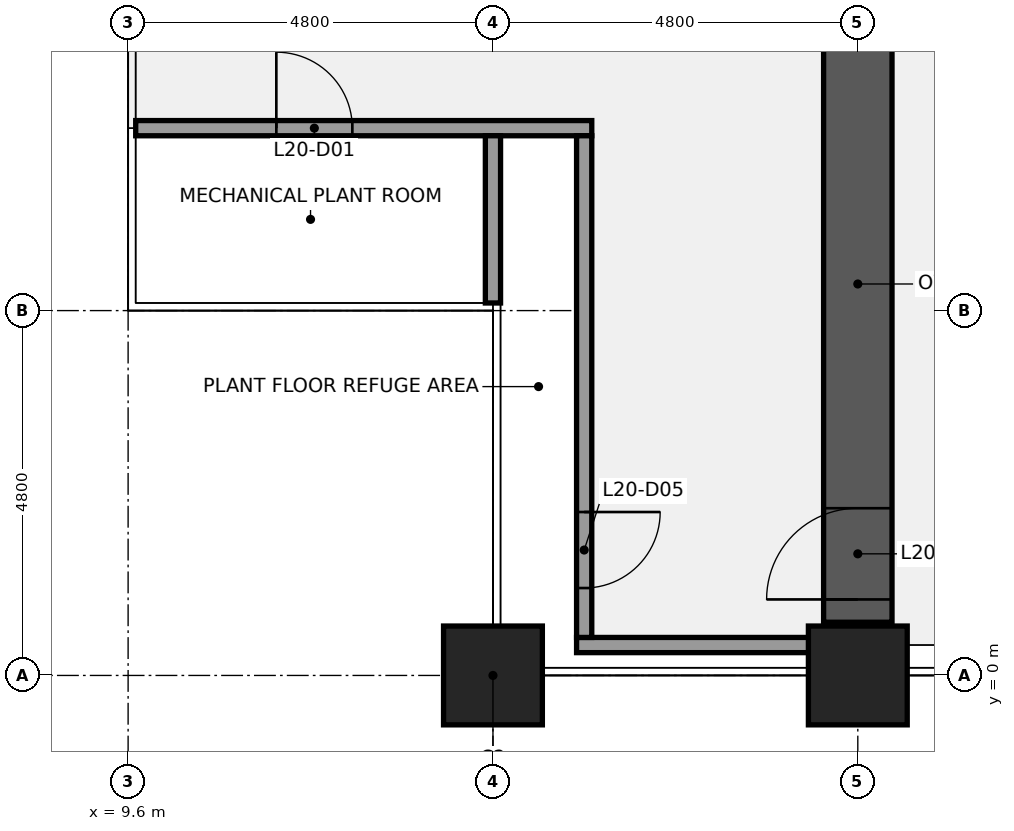
"""IFC4 building model, lengths in metres.
Left out: names, types, materials, properties, quantities, classifications, styles, units other than length and angle.
Written with IfcOpenShell. Run it as: python <this file> out.ifc"""

import sys

from ifc_helpers import new_model, si_unit, direction, frame, frame_2d, origin, origin_2d, place, context, subcontext, project, spatial, rectangle, extrude, element, fill, save


model = new_model("IFC4")
c1 = context("Model", 3, precision=1e-05, world=origin(), true_north=direction((0.0, 1.0)))
c2 = subcontext(c1, "Body", "Model", "MODEL_VIEW")
j1 = project(units=[si_unit("LENGTHUNIT", "METRE"), si_unit("PLANEANGLEUNIT", "RADIAN")], contexts=[c1])
p1 = place(None, origin())
s1 = spatial("IfcSite", under=j1, at=p1, CompositionType="ELEMENT")
p2 = place(p1, origin())
s2 = spatial("IfcBuilding", under=s1, at=p2, CompositionType="ELEMENT")
p3 = place(p2, frame((0.0, 0.0, 91.5)))
s3 = spatial("IfcBuildingStorey", under=s2, at=p3, CompositionType="ELEMENT", Elevation=91.5)
for number, where, z_axis, x_axis in (
    (1, (14.4, 0.0, 0.0), (0.0, 0.0, 1.0), (1.0, 0.0, 0.0)),
    (2, (19.2, 0.0, 0.0), (0.0, 0.0, 1.0), (1.0, 0.0, 0.0)),
):
    element("IfcColumn", number, at=place(p3, frame(where, z_axis=z_axis, x_axis=x_axis)), inside=s3, PredefinedType="COLUMN", context=c2, shape_type="SweptSolid", body=[
        extrude(rectangle(XDim=1.3, YDim=1.3, at=origin_2d()), origin(), (0.0, 0.0, 1.0), 12.6),
    ])
p4 = place(p3, frame((19.2, 0.7, 0.0), z_axis=(0.0, 0.0, 1.0), x_axis=(0.0, 1.0, 0.0)))
e3 = element("IfcWall", 3, at=p4, inside=s3, PredefinedType="SHEAR", context=c2, shape_type="SweptSolid", body=[
    extrude(rectangle(XDim=8.9, YDim=0.9, at=frame_2d((4.45, 0.0))), origin(), (0.0, 0.0, 1.0), 12.3),
])
p5 = place(p4, frame((0.3, 0.0, 0.0)))
e4 = element("IfcOpeningElement", 4, at=p5, cuts=e3, PredefinedType="OPENING", context=c2, shape_type="SweptSolid", body=[
    extrude(rectangle(XDim=1.2, YDim=2.1, at=frame_2d((0.6, 1.05))), frame((0.0, 0.46, 0.0), z_axis=(0.0, -1.0, 0.0), x_axis=(1.0, 0.0, 0.0)), (0.0, 0.0, 1.0), 0.92),
])
p6 = place(p3, frame((15.5, 0.4, 0.0), z_axis=(0.0, 0.0, 1.0), x_axis=(1.0, 0.0, 0.0)))
e5 = element("IfcWall", 5, at=p6, inside=s3, PredefinedType="PARTITIONING", context=c2, shape_type="SweptSolid", body=[
    extrude(rectangle(XDim=3.8, YDim=0.2, at=frame_2d((1.9, 0.0))), origin(), (0.0, 0.0, 1.0), 11.309),
])
p7 = place(p3, frame((9.7, 7.2, 0.0), z_axis=(0.0, 0.0, 1.0), x_axis=(1.0, 0.0, 0.0)))
e6 = element("IfcWall", 6, at=p7, inside=s3, PredefinedType="PARTITIONING", context=c2, shape_type="SweptSolid", body=[
    extrude(rectangle(XDim=6.0, YDim=0.2, at=frame_2d((3.0, 0.0))), origin(), (0.0, 0.0, 1.0), 11.309),
])
p8 = place(p7, frame((1.85, 0.0, 0.0)))
e7 = element("IfcOpeningElement", 7, at=p8, cuts=e6, PredefinedType="OPENING", context=c2, shape_type="SweptSolid", body=[
    extrude(rectangle(XDim=1.0, YDim=2.1, at=frame_2d((0.5, 1.05))), frame((0.0, 0.11, 0.0), z_axis=(0.0, -1.0, 0.0), x_axis=(1.0, 0.0, 0.0)), (0.0, 0.0, 1.0), 0.22),
])
p9 = place(p3, frame((14.4, 4.9, 0.0), z_axis=(0.0, 0.0, 1.0), x_axis=(0.0, 1.0, 0.0)))
e8 = element("IfcWall", 8, at=p9, inside=s3, PredefinedType="PARTITIONING", context=c2, shape_type="SweptSolid", body=[
    extrude(rectangle(XDim=2.2, YDim=0.2, at=frame_2d((1.1, 0.0))), origin(), (0.0, 0.0, 1.0), 11.309),
])
p10 = place(p3, frame((15.6, 0.5, 0.0), z_axis=(0.0, 0.0, 1.0), x_axis=(0.0, 1.0, 0.0)))
e9 = element("IfcWall", 9, at=p10, inside=s3, PredefinedType="PARTITIONING", context=c2, shape_type="SweptSolid", body=[
    extrude(rectangle(XDim=6.6, YDim=0.2, at=frame_2d((3.3, 0.0))), origin(), (0.0, 0.0, 1.0), 11.309),
])
p11 = place(p10, frame((0.65, 0.0, 0.0)))
e10 = element("IfcOpeningElement", 10, at=p11, cuts=e9, PredefinedType="OPENING", context=c2, shape_type="SweptSolid", body=[
    extrude(rectangle(XDim=1.0, YDim=2.1, at=frame_2d((0.5, 1.05))), frame((0.0, 0.11, 0.0), z_axis=(0.0, -1.0, 0.0), x_axis=(1.0, 0.0, 0.0)), (0.0, 0.0, 1.0), 0.22),
])
for number, where, z_axis, x_axis in (
    (11, (14.4, -1.075, 0.0), (0.0, 0.0, 1.0), (1.0, 0.0, 0.0)),
    (12, (19.2, -1.075, 0.0), (0.0, 0.0, 1.0), (1.0, 0.0, 0.0)),
):
    element("IfcColumn", number, at=place(p3, frame(where, z_axis=z_axis, x_axis=x_axis)), inside=s3, PredefinedType="PILASTER", context=c2, shape_type="SweptSolid", body=[
        extrude(rectangle(XDim=4.2, YDim=0.85, at=origin_2d()), origin(), (0.0, 0.0, 1.0), 12.6),
    ])
p12 = place(p8, origin())
e13 = element("IfcDoor", 13, at=p12, inside=s3, OperationType="SINGLE_SWING_LEFT", PredefinedType="DOOR", context=c2, shape_type="SweptSolid", body=[
    extrude(rectangle(XDim=1.0, YDim=2.1, at=frame_2d((0.5, 1.05))), frame((0.0, 0.025, 0.0), z_axis=(0.0, -1.0, 0.0), x_axis=(1.0, 0.0, 0.0)), (0.0, 0.0, 1.0), 0.05),
])
fill(e7, e13)
p13 = place(p11, origin())
e14 = element("IfcDoor", 14, at=p13, inside=s3, OperationType="SINGLE_SWING_RIGHT", PredefinedType="DOOR", context=c2, shape_type="SweptSolid", body=[
    extrude(rectangle(XDim=1.0, YDim=2.1, at=frame_2d((0.5, 1.05))), frame((0.0, 0.025, 0.0), z_axis=(0.0, -1.0, 0.0), x_axis=(1.0, 0.0, 0.0)), (0.0, 0.0, 1.0), 0.05),
])
fill(e10, e14)
p14 = place(p5, origin())
e15 = element("IfcDoor", 15, at=p14, inside=s3, OperationType="SINGLE_SWING_LEFT", PredefinedType="DOOR", context=c2, shape_type="SweptSolid", body=[
    extrude(rectangle(XDim=1.2, YDim=2.1, at=frame_2d((0.6, 1.05))), frame((0.0, 0.025, 0.0), z_axis=(0.0, -1.0, 0.0), x_axis=(1.0, 0.0, 0.0)), (0.0, 0.0, 1.0), 0.05),
])
fill(e4, e15)
save(model, sys.argv[1])
